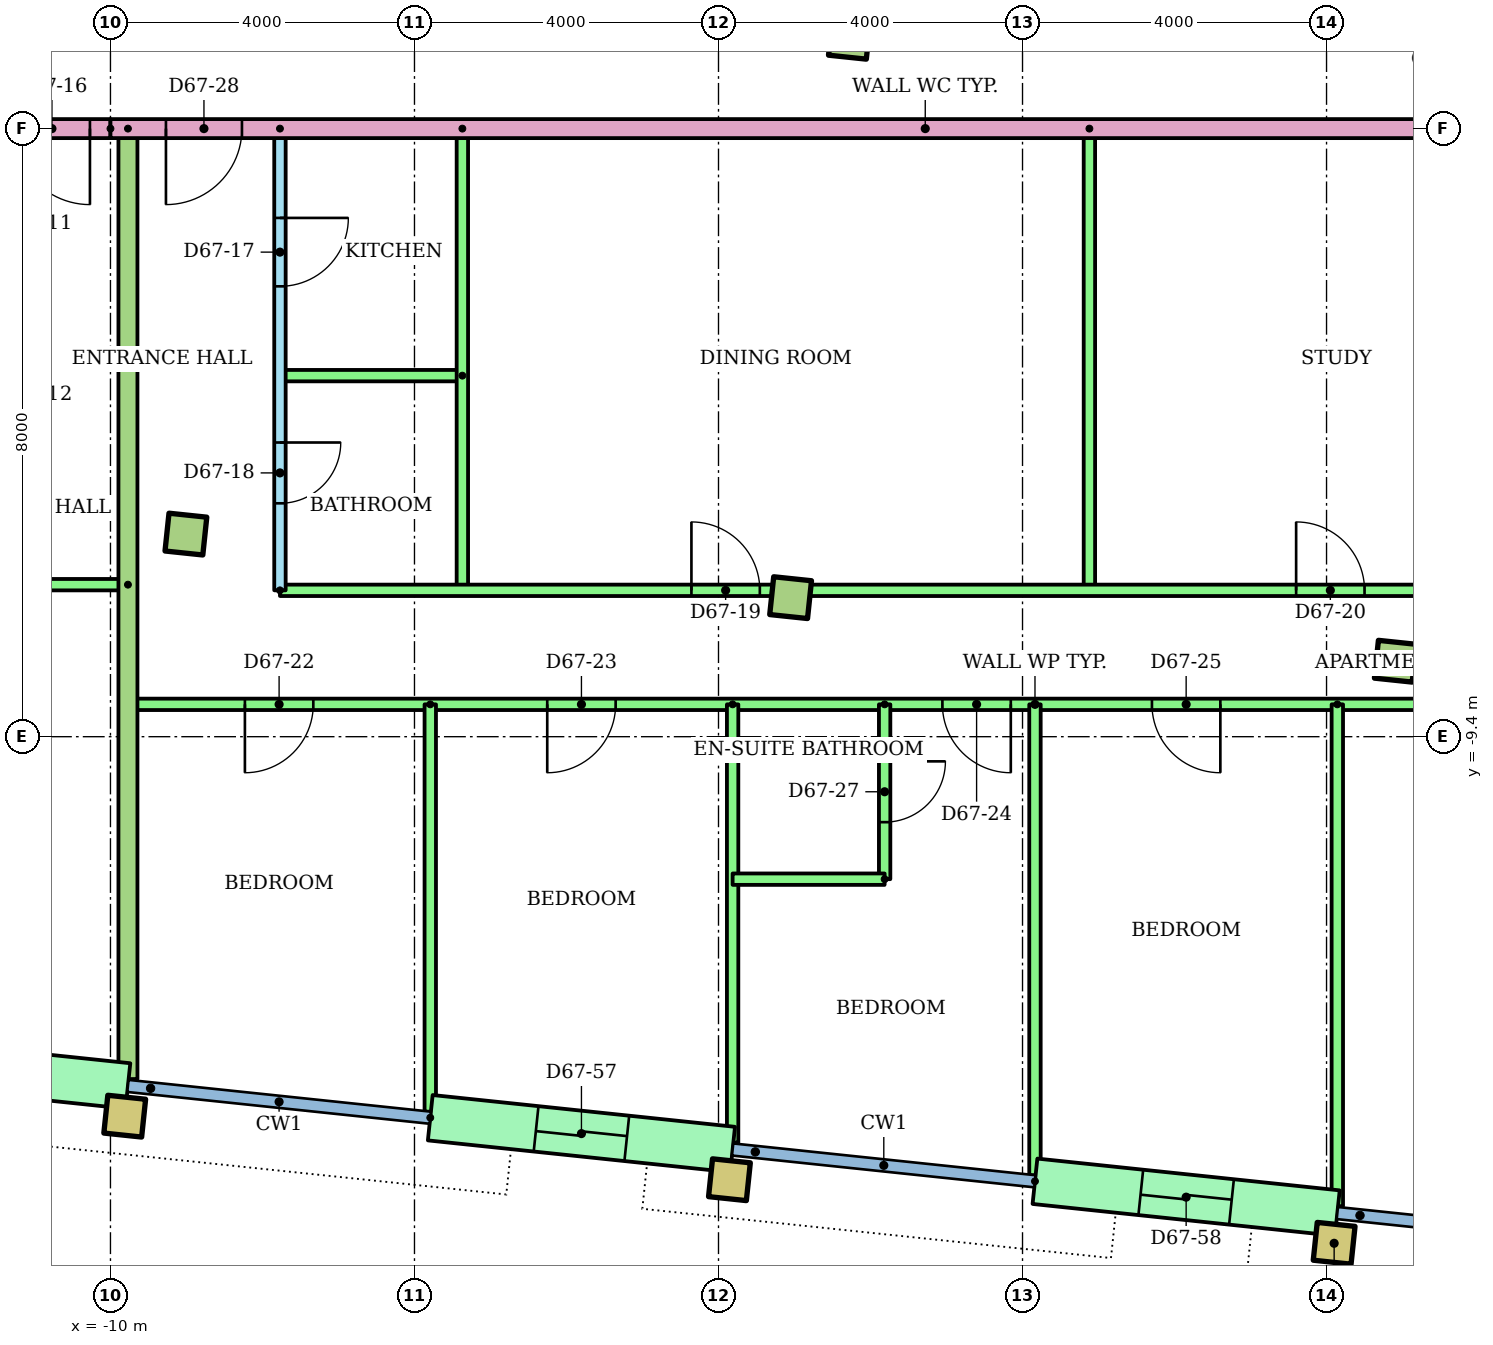
"""IFC4 building model, lengths in metres.
Left out: names, types, materials, properties, quantities, classifications, styles, units other than length and angle.
Written with IfcOpenShell. Run it as: python <this file> out.ifc"""

import sys

from ifc_helpers import new_model, si_unit, direction, frame, frame_2d, origin, origin_2d, place, context, subcontext, project, spatial, rectangle, hollow_rectangle, extrude, element, fill, save


model = new_model("IFC4")
c1 = context("Model", 3, precision=1e-05, world=origin(), true_north=direction((0.0, 1.0)))
c2 = subcontext(c1, "Body", "Model", "MODEL_VIEW")
j1 = project(units=[si_unit("LENGTHUNIT", "METRE"), si_unit("PLANEANGLEUNIT", "RADIAN")], contexts=[c1])
p1 = place(None, origin())
s1 = spatial("IfcSite", under=j1, at=p1, CompositionType="ELEMENT")
p2 = place(p1, origin())
s2 = spatial("IfcBuilding", under=s1, at=p2, CompositionType="ELEMENT")
p3 = place(p2, frame((0.0, 0.0, 259.5)))
s3 = spatial("IfcBuildingStorey", under=s2, at=p3, CompositionType="ELEMENT", Elevation=259.5)
for number, where, z_axis, x_axis in (
    (1, (-9.812, -14.392, 0.0), (0.0, 0.0, 1.0), (0.995, -0.105, 0.0)),
    (2, (-1.856, -15.229, 0.0), (0.0, 0.0, 1.0), (0.995, -0.105, 0.0)),
    (3, (6.1, -16.065, 0.0), (0.0, 0.0, 1.0), (0.995, -0.105, 0.0)),
):
    element("IfcColumn", number, at=place(p3, frame(where, z_axis=z_axis, x_axis=x_axis)), inside=s3, PredefinedType="COLUMN", context=c2, shape_type="SweptSolid", body=[
        extrude(hollow_rectangle(XDim=0.5, YDim=0.5, WallThickness=0.025, at=origin_2d()), origin(), (0.0, 0.0, 1.0), 3.2),
    ])
for number, where, z_axis, x_axis in (
    (4, (-9.007, -6.735, 0.0), (0.0, 0.0, 1.0), (0.995, -0.105, 0.0)),
    (5, (-1.051, -7.571, 0.0), (0.0, 0.0, 1.0), (0.995, -0.105, 0.0)),
    (6, (6.905, -8.407, 0.0), (0.0, 0.0, 1.0), (0.995, -0.105, 0.0)),
    (7, (-0.278, -0.211, 0.0), (0.0, 0.0, 1.0), (0.995, -0.105, 0.0)),
):
    element("IfcColumn", number, at=place(p3, frame(where, z_axis=z_axis, x_axis=x_axis)), inside=s3, PredefinedType="COLUMN", context=c2, shape_type="SweptSolid", body=[
        extrude(rectangle(XDim=0.5, YDim=0.5, at=origin_2d()), origin(), (0.0, 0.0, 1.0), 3.2),
    ])
p4 = place(p3, frame((-13.749, -13.576, 0.0), z_axis=(0.0, 0.0, 1.0), x_axis=(0.994519156568, -0.104554517933, 0.0)))
e8 = element("IfcWall", 8, at=p4, inside=s3, PredefinedType="STANDARD", context=c2, shape_type="SweptSolid", body=[
    extrude(rectangle(XDim=4.0, YDim=0.6, at=frame_2d((2.0, 0.0))), origin(), (0.0, 0.0, 1.0), 2.92),
])
p5 = place(p4, frame((1.4, 0.0, 0.0)))
e9 = element("IfcOpeningElement", 9, at=p5, cuts=e8, PredefinedType="OPENING", context=c2, shape_type="SweptSolid", body=[
    extrude(rectangle(XDim=1.2, YDim=2.1, at=frame_2d((0.6, 1.05))), frame((0.0, 0.31, 0.0), z_axis=(0.0, -1.0, 0.0), x_axis=(1.0, 0.0, 0.0)), (0.0, 0.0, 1.0), 0.62),
])
p6 = place(p3, frame((-5.792, -14.413, 0.0), z_axis=(0.0, 0.0, 1.0), x_axis=(0.99452550138, -0.104494148666, 0.0)))
e10 = element("IfcWall", 10, at=p6, inside=s3, PredefinedType="STANDARD", context=c2, shape_type="SweptSolid", body=[
    extrude(rectangle(XDim=4.0, YDim=0.6, at=frame_2d((2.0, 0.0))), origin(), (0.0, 0.0, 1.0), 2.92),
])
p7 = place(p6, frame((1.4, 0.0, 0.0)))
e11 = element("IfcOpeningElement", 11, at=p7, cuts=e10, PredefinedType="OPENING", context=c2, shape_type="SweptSolid", body=[
    extrude(rectangle(XDim=1.2, YDim=2.1, at=frame_2d((0.6, 1.05))), frame((0.0, 0.31, 0.0), z_axis=(0.0, -1.0, 0.0), x_axis=(1.0, 0.0, 0.0)), (0.0, 0.0, 1.0), 0.62),
])
p8 = place(p3, frame((2.164, -15.249, 0.0), z_axis=(0.0, 0.0, 1.0), x_axis=(0.99452550138, -0.104494148666, 0.0)))
e12 = element("IfcWall", 12, at=p8, inside=s3, PredefinedType="STANDARD", context=c2, shape_type="SweptSolid", body=[
    extrude(rectangle(XDim=4.0, YDim=0.6, at=frame_2d((2.0, 0.0))), origin(), (0.0, 0.0, 1.0), 2.92),
])
p9 = place(p8, frame((1.4, 0.0, 0.0)))
e13 = element("IfcOpeningElement", 13, at=p9, cuts=e12, PredefinedType="OPENING", context=c2, shape_type="SweptSolid", body=[
    extrude(rectangle(XDim=1.2, YDim=2.1, at=frame_2d((0.6, 1.05))), frame((0.0, 0.31, 0.0), z_axis=(0.0, -1.0, 0.0), x_axis=(1.0, 0.0, 0.0)), (0.0, 0.0, 1.0), 0.62),
])
p10 = place(p3, frame((-9.77, -7.4, 0.0), z_axis=(0.0, 0.0, 1.0), x_axis=(-1.0, 0.0, 0.0)))
e14 = element("IfcWall", 14, at=p10, inside=s3, PredefinedType="PARTITIONING", context=c2, shape_type="SweptSolid", body=[
    extrude(rectangle(XDim=14.411, YDim=0.15, at=frame_2d((7.206, 0.0))), origin(), (0.0, 0.0, 1.0), 2.4),
])
p11 = place(p10, frame((5.789, 0.0, 0.0)))
e15 = element("IfcOpeningElement", 15, at=p11, cuts=e14, PredefinedType="OPENING", context=c2, shape_type="SweptSolid", body=[
    extrude(rectangle(XDim=1.0, YDim=2.1, at=frame_2d((0.5, 1.05))), frame((0.0, 0.085, 0.0), z_axis=(0.0, -1.0, 0.0), x_axis=(1.0, 0.0, 0.0)), (0.0, 0.0, 1.0), 0.17),
])
p12 = place(p3, frame((-7.77, -1.4, 0.0), z_axis=(0.0, 0.0, 1.0), x_axis=(0.0, -1.0, 0.0)))
e16 = element("IfcWall", 16, at=p12, inside=s3, PredefinedType="PARTITIONING", context=c2, shape_type="SweptSolid", body=[
    extrude(rectangle(XDim=6.075, YDim=0.15, at=frame_2d((3.037, 0.0))), origin(), (0.0, 0.0, 1.0), 2.4),
])
p13 = place(p12, frame((1.175, 0.0, 0.0)))
e17 = element("IfcOpeningElement", 17, at=p13, cuts=e16, PredefinedType="OPENING", context=c2, shape_type="SweptSolid", body=[
    extrude(rectangle(XDim=0.9, YDim=2.1, at=frame_2d((0.45, 1.05))), frame((0.0, 0.085, 0.0), z_axis=(0.0, -1.0, 0.0), x_axis=(1.0, 0.0, 0.0)), (0.0, 0.0, 1.0), 0.17),
])
p14 = place(p12, frame((4.13, 0.0, 0.0)))
e18 = element("IfcOpeningElement", 18, at=p14, cuts=e16, PredefinedType="OPENING", context=c2, shape_type="SweptSolid", body=[
    extrude(rectangle(XDim=0.8, YDim=2.1, at=frame_2d((0.4, 1.05))), frame((0.0, 0.085, 0.0), z_axis=(0.0, -1.0, 0.0), x_axis=(1.0, 0.0, 0.0)), (0.0, 0.0, 1.0), 0.17),
])
p15 = place(p3, frame((-5.37, -4.65, 0.0), z_axis=(0.0, 0.0, 1.0), x_axis=(-1.0, 0.0, 0.0)))
e19 = element("IfcWall", 19, at=p15, inside=s3, PredefinedType="PARTITIONING", context=c2, shape_type="SweptSolid", body=[
    extrude(rectangle(XDim=2.4, YDim=0.15, at=frame_2d((1.2, 0.0))), origin(), (0.0, 0.0, 1.0), 2.4),
])
for number, where, z_axis, x_axis in (
    (20, (-5.37, -1.4, 0.0), (0.0, 0.0, 1.0), (0.0, -1.0, 0.0)),
    (21, (2.88, -1.4, 0.0), (0.0, 0.0, 1.0), (0.0, -1.0, 0.0)),
):
    element("IfcWall", number, at=place(p3, frame(where, z_axis=z_axis, x_axis=x_axis)), inside=s3, PredefinedType="PARTITIONING", context=c2, shape_type="SweptSolid", body=[
        extrude(rectangle(XDim=6.075, YDim=0.15, at=frame_2d((3.037, 0.0))), origin(), (0.0, 0.0, 1.0), 2.4),
    ])
p16 = place(p3, frame((-7.77, -7.475, 0.0)))
e22 = element("IfcWall", 22, at=p16, inside=s3, PredefinedType="PARTITIONING", context=c2, shape_type="SweptSolid", body=[
    extrude(rectangle(XDim=21.868, YDim=0.15, at=frame_2d((10.934, 0.0))), origin(), (0.0, 0.0, 1.0), 2.4),
])
p17 = place(p16, frame((5.414, 0.0, 0.0)))
e23 = element("IfcOpeningElement", 23, at=p17, cuts=e22, PredefinedType="OPENING", context=c2, shape_type="SweptSolid", body=[
    extrude(rectangle(XDim=0.9, YDim=2.1, at=frame_2d((0.45, 1.05))), frame((0.0, 0.085, 0.0), z_axis=(0.0, -1.0, 0.0), x_axis=(1.0, 0.0, 0.0)), (0.0, 0.0, 1.0), 0.17),
])
p18 = place(p16, frame((13.37, 0.0, 0.0)))
e24 = element("IfcOpeningElement", 24, at=p18, cuts=e22, PredefinedType="OPENING", context=c2, shape_type="SweptSolid", body=[
    extrude(rectangle(XDim=0.9, YDim=2.1, at=frame_2d((0.45, 1.05))), frame((0.0, 0.085, 0.0), z_axis=(0.0, -1.0, 0.0), x_axis=(1.0, 0.0, 0.0)), (0.0, 0.0, 1.0), 0.17),
])
p19 = place(p16, frame((19.059, 0.0, 0.0)))
e25 = element("IfcOpeningElement", 25, at=p19, cuts=e22, PredefinedType="OPENING", context=c2, shape_type="SweptSolid", body=[
    extrude(rectangle(XDim=0.9, YDim=2.1, at=frame_2d((0.45, 1.05))), frame((0.0, 0.085, 0.0), z_axis=(0.0, -1.0, 0.0), x_axis=(1.0, 0.0, 0.0)), (0.0, 0.0, 1.0), 0.17),
])
p20 = place(p3, frame((14.098, -8.975, 0.0), z_axis=(0.0, 0.0, 1.0), x_axis=(-1.0, 0.0, 0.0)))
e26 = element("IfcWall", 26, at=p20, inside=s3, PredefinedType="PARTITIONING", context=c2, shape_type="SweptSolid", body=[
    extrude(rectangle(XDim=23.868, YDim=0.15, at=frame_2d((11.934, 0.0))), origin(), (0.0, 0.0, 1.0), 2.4),
])
p21 = place(p20, frame((21.429, 0.0, 0.0)))
e27 = element("IfcOpeningElement", 27, at=p21, cuts=e26, PredefinedType="OPENING", context=c2, shape_type="SweptSolid", body=[
    extrude(rectangle(XDim=0.9, YDim=2.1, at=frame_2d((0.45, 1.05))), frame((0.0, 0.085, 0.0), z_axis=(0.0, -1.0, 0.0), x_axis=(1.0, 0.0, 0.0)), (0.0, 0.0, 1.0), 0.17),
])
p22 = place(p20, frame((17.451, 0.0, 0.0)))
e28 = element("IfcOpeningElement", 28, at=p22, cuts=e26, PredefinedType="OPENING", context=c2, shape_type="SweptSolid", body=[
    extrude(rectangle(XDim=0.9, YDim=2.1, at=frame_2d((0.45, 1.05))), frame((0.0, 0.085, 0.0), z_axis=(0.0, -1.0, 0.0), x_axis=(1.0, 0.0, 0.0)), (0.0, 0.0, 1.0), 0.17),
])
p23 = place(p20, frame((12.252, 0.0, 0.0)))
e29 = element("IfcOpeningElement", 29, at=p23, cuts=e26, PredefinedType="OPENING", context=c2, shape_type="SweptSolid", body=[
    extrude(rectangle(XDim=0.9, YDim=2.1, at=frame_2d((0.45, 1.05))), frame((0.0, 0.085, 0.0), z_axis=(0.0, -1.0, 0.0), x_axis=(1.0, 0.0, 0.0)), (0.0, 0.0, 1.0), 0.17),
])
p24 = place(p20, frame((9.495, 0.0, 0.0)))
e30 = element("IfcOpeningElement", 30, at=p24, cuts=e26, PredefinedType="OPENING", context=c2, shape_type="SweptSolid", body=[
    extrude(rectangle(XDim=0.9, YDim=2.1, at=frame_2d((0.45, 1.05))), frame((0.0, 0.085, 0.0), z_axis=(0.0, -1.0, 0.0), x_axis=(1.0, 0.0, 0.0)), (0.0, 0.0, 1.0), 0.17),
])
p25 = place(p20, frame((3.478, 0.0, 0.0)))
e31 = element("IfcOpeningElement", 31, at=p25, cuts=e26, PredefinedType="OPENING", context=c2, shape_type="SweptSolid", body=[
    extrude(rectangle(XDim=1.0, YDim=2.1, at=frame_2d((0.5, 1.05))), frame((0.0, 0.085, 0.0), z_axis=(0.0, -1.0, 0.0), x_axis=(1.0, 0.0, 0.0)), (0.0, 0.0, 1.0), 0.17),
])
p26 = place(p3, frame((-5.792, -8.975, 0.0), z_axis=(0.0, 0.0, 1.0), x_axis=(0.0, -1.0, 0.0)))
e32 = element("IfcWall", 32, at=p26, inside=s3, PredefinedType="PARTITIONING", context=c2, shape_type="SweptSolid", body=[
    extrude(rectangle(XDim=5.359, YDim=0.15, at=frame_2d((2.679, 0.0))), origin(), (0.0, 0.0, 1.0), 2.4),
])
p27 = place(p3, frame((-1.814, -8.975, 0.0), z_axis=(0.0, 0.0, 1.0), x_axis=(0.0, -1.0, 0.0)))
e33 = element("IfcWall", 33, at=p27, inside=s3, PredefinedType="PARTITIONING", context=c2, shape_type="SweptSolid", body=[
    extrude(rectangle(XDim=5.766, YDim=0.15, at=frame_2d((2.883, 0.0))), origin(), (0.0, 0.0, 1.0), 2.4),
])
p28 = place(p3, frame((2.164, -8.975, 0.0), z_axis=(0.0, 0.0, 1.0), x_axis=(0.0, -1.0, 0.0)))
e34 = element("IfcWall", 34, at=p28, inside=s3, PredefinedType="PARTITIONING", context=c2, shape_type="SweptSolid", body=[
    extrude(rectangle(XDim=6.195, YDim=0.15, at=frame_2d((3.097, 0.0))), origin(), (0.0, 0.0, 1.0), 2.4),
])
p29 = place(p3, frame((6.142, -8.975, 0.0), z_axis=(0.0, 0.0, 1.0), x_axis=(0.0, -1.0, 0.0)))
e35 = element("IfcWall", 35, at=p29, inside=s3, PredefinedType="PARTITIONING", context=c2, shape_type="SweptSolid", body=[
    extrude(rectangle(XDim=6.602, YDim=0.15, at=frame_2d((3.301, 0.0))), origin(), (0.0, 0.0, 1.0), 2.4),
])
p30 = place(p3, frame((0.186, -8.975, 0.0), z_axis=(0.0, 0.0, 1.0), x_axis=(0.0, -1.0, 0.0)))
e36 = element("IfcWall", 36, at=p30, inside=s3, PredefinedType="PARTITIONING", context=c2, shape_type="SweptSolid", body=[
    extrude(rectangle(XDim=2.3, YDim=0.15, at=frame_2d((1.15, 0.0))), origin(), (0.0, 0.0, 1.0), 2.4),
])
p31 = place(p30, frame((0.75, 0.0, 0.0)))
e37 = element("IfcOpeningElement", 37, at=p31, cuts=e36, PredefinedType="OPENING", context=c2, shape_type="SweptSolid", body=[
    extrude(rectangle(XDim=0.8, YDim=2.1, at=frame_2d((0.4, 1.05))), frame((0.0, 0.085, 0.0), z_axis=(0.0, -1.0, 0.0), x_axis=(1.0, 0.0, 0.0)), (0.0, 0.0, 1.0), 0.17),
])
p32 = place(p3, frame((0.186, -11.274, 0.0), z_axis=(0.0, 0.0, 1.0), x_axis=(-1.0, 0.0, 0.0)))
e38 = element("IfcWall", 38, at=p32, inside=s3, PredefinedType="PARTITIONING", context=c2, shape_type="SweptSolid", body=[
    extrude(rectangle(XDim=2.0, YDim=0.15, at=frame_2d((1.0, 0.0))), origin(), (0.0, 0.0, 1.0), 2.4),
])
p33 = place(p3, frame((-9.77, -1.4, 0.0), z_axis=(0.0, 0.0, 1.0), x_axis=(0.0, -1.0, 0.0)))
e39 = element("IfcWall", 39, at=p33, inside=s3, PredefinedType="PARTITIONING", context=c2, shape_type="SweptSolid", body=[
    extrude(rectangle(XDim=12.504, YDim=0.25, at=frame_2d((6.252, 0.0))), origin(), (0.0, 0.0, 1.0), 2.4),
])
p34 = place(p3, frame((-10.0, -1.4, 0.0), z_axis=(0.0, 0.0, 1.0), x_axis=(-1.0, 0.0, 0.0)))
e40 = element("IfcWall", 40, at=p34, inside=s3, PredefinedType="PARTITIONING", context=c2, shape_type="SweptSolid", body=[
    extrude(rectangle(XDim=13.56, YDim=0.25, at=frame_2d((6.78, 0.0))), origin(), (0.0, 0.0, 1.0), 2.4),
])
p35 = place(p34, frame((0.27, 0.0, 0.0)))
e41 = element("IfcOpeningElement", 41, at=p35, cuts=e40, PredefinedType="OPENING", context=c2, shape_type="SweptSolid", body=[
    extrude(rectangle(XDim=1.0, YDim=2.1, at=frame_2d((0.5, 1.05))), frame((0.0, 0.135, 0.0), z_axis=(0.0, -1.0, 0.0), x_axis=(1.0, 0.0, 0.0)), (0.0, 0.0, 1.0), 0.27),
])
p36 = place(p3, frame((10.0, -1.4, 0.0), z_axis=(0.0, 0.0, 1.0), x_axis=(-1.0, 0.0, 0.0)))
e42 = element("IfcWall", 42, at=p36, inside=s3, PredefinedType="PARTITIONING", context=c2, shape_type="SweptSolid", body=[
    extrude(rectangle(XDim=20.0, YDim=0.25, at=frame_2d((10.0, 0.0))), origin(), (0.0, 0.0, 1.0), 2.4),
])
p37 = place(p36, frame((18.27, 0.0, 0.0)))
e43 = element("IfcOpeningElement", 43, at=p37, cuts=e42, PredefinedType="OPENING", context=c2, shape_type="SweptSolid", body=[
    extrude(rectangle(XDim=1.0, YDim=2.1, at=frame_2d((0.5, 1.05))), frame((0.0, 0.135, 0.0), z_axis=(0.0, -1.0, 0.0), x_axis=(1.0, 0.0, 0.0)), (0.0, 0.0, 1.0), 0.27),
])
p38 = place(p35, origin())
e44 = element("IfcDoor", 44, at=p38, inside=s3, OperationType="SINGLE_SWING_LEFT", PredefinedType="DOOR", context=c2, shape_type="SweptSolid", body=[
    extrude(rectangle(XDim=1.0, YDim=2.1, at=frame_2d((0.5, 1.05))), frame((0.0, 0.025, 0.0), z_axis=(0.0, -1.0, 0.0), x_axis=(1.0, 0.0, 0.0)), (0.0, 0.0, 1.0), 0.05),
])
fill(e41, e44)
p39 = place(p13, origin())
e45 = element("IfcDoor", 45, at=p39, inside=s3, OperationType="SINGLE_SWING_LEFT", PredefinedType="DOOR", context=c2, shape_type="SweptSolid", body=[
    extrude(rectangle(XDim=0.9, YDim=2.1, at=frame_2d((0.45, 1.05))), frame((0.0, 0.025, 0.0), z_axis=(0.0, -1.0, 0.0), x_axis=(1.0, 0.0, 0.0)), (0.0, 0.0, 1.0), 0.05),
])
fill(e17, e45)
p40 = place(p14, origin())
e46 = element("IfcDoor", 46, at=p40, inside=s3, OperationType="SINGLE_SWING_LEFT", PredefinedType="DOOR", context=c2, shape_type="SweptSolid", body=[
    extrude(rectangle(XDim=0.8, YDim=2.1, at=frame_2d((0.4, 1.05))), frame((0.0, 0.025, 0.0), z_axis=(0.0, -1.0, 0.0), x_axis=(1.0, 0.0, 0.0)), (0.0, 0.0, 1.0), 0.05),
])
fill(e18, e46)
p41 = place(p17, origin())
e47 = element("IfcDoor", 47, at=p41, inside=s3, OperationType="SINGLE_SWING_LEFT", PredefinedType="DOOR", context=c2, shape_type="SweptSolid", body=[
    extrude(rectangle(XDim=0.9, YDim=2.1, at=frame_2d((0.45, 1.05))), frame((0.0, 0.025, 0.0), z_axis=(0.0, -1.0, 0.0), x_axis=(1.0, 0.0, 0.0)), (0.0, 0.0, 1.0), 0.05),
])
fill(e23, e47)
p42 = place(p18, origin())
e48 = element("IfcDoor", 48, at=p42, inside=s3, OperationType="SINGLE_SWING_LEFT", PredefinedType="DOOR", context=c2, shape_type="SweptSolid", body=[
    extrude(rectangle(XDim=0.9, YDim=2.1, at=frame_2d((0.45, 1.05))), frame((0.0, 0.025, 0.0), z_axis=(0.0, -1.0, 0.0), x_axis=(1.0, 0.0, 0.0)), (0.0, 0.0, 1.0), 0.05),
])
fill(e24, e48)
p43 = place(p21, origin())
e49 = element("IfcDoor", 49, at=p43, inside=s3, OperationType="SINGLE_SWING_RIGHT", PredefinedType="DOOR", context=c2, shape_type="SweptSolid", body=[
    extrude(rectangle(XDim=0.9, YDim=2.1, at=frame_2d((0.45, 1.05))), frame((0.0, 0.025, 0.0), z_axis=(0.0, -1.0, 0.0), x_axis=(1.0, 0.0, 0.0)), (0.0, 0.0, 1.0), 0.05),
])
fill(e27, e49)
p44 = place(p22, origin())
e50 = element("IfcDoor", 50, at=p44, inside=s3, OperationType="SINGLE_SWING_RIGHT", PredefinedType="DOOR", context=c2, shape_type="SweptSolid", body=[
    extrude(rectangle(XDim=0.9, YDim=2.1, at=frame_2d((0.45, 1.05))), frame((0.0, 0.025, 0.0), z_axis=(0.0, -1.0, 0.0), x_axis=(1.0, 0.0, 0.0)), (0.0, 0.0, 1.0), 0.05),
])
fill(e28, e50)
p45 = place(p23, origin())
e51 = element("IfcDoor", 51, at=p45, inside=s3, OperationType="SINGLE_SWING_LEFT", PredefinedType="DOOR", context=c2, shape_type="SweptSolid", body=[
    extrude(rectangle(XDim=0.9, YDim=2.1, at=frame_2d((0.45, 1.05))), frame((0.0, 0.025, 0.0), z_axis=(0.0, -1.0, 0.0), x_axis=(1.0, 0.0, 0.0)), (0.0, 0.0, 1.0), 0.05),
])
fill(e29, e51)
p46 = place(p24, origin())
e52 = element("IfcDoor", 52, at=p46, inside=s3, OperationType="SINGLE_SWING_LEFT", PredefinedType="DOOR", context=c2, shape_type="SweptSolid", body=[
    extrude(rectangle(XDim=0.9, YDim=2.1, at=frame_2d((0.45, 1.05))), frame((0.0, 0.025, 0.0), z_axis=(0.0, -1.0, 0.0), x_axis=(1.0, 0.0, 0.0)), (0.0, 0.0, 1.0), 0.05),
])
fill(e30, e52)
p47 = place(p31, origin())
e53 = element("IfcDoor", 53, at=p47, inside=s3, OperationType="SINGLE_SWING_LEFT", PredefinedType="DOOR", context=c2, shape_type="SweptSolid", body=[
    extrude(rectangle(XDim=0.8, YDim=2.1, at=frame_2d((0.4, 1.05))), frame((0.0, 0.025, 0.0), z_axis=(0.0, -1.0, 0.0), x_axis=(1.0, 0.0, 0.0)), (0.0, 0.0, 1.0), 0.05),
])
fill(e37, e53)
p48 = place(p37, origin())
e54 = element("IfcDoor", 54, at=p48, inside=s3, OperationType="SINGLE_SWING_RIGHT", PredefinedType="DOOR", context=c2, shape_type="SweptSolid", body=[
    extrude(rectangle(XDim=1.0, YDim=2.1, at=frame_2d((0.5, 1.05))), frame((0.0, 0.025, 0.0), z_axis=(0.0, -1.0, 0.0), x_axis=(1.0, 0.0, 0.0)), (0.0, 0.0, 1.0), 0.05),
])
fill(e43, e54)
p49 = place(p7, origin())
e55 = element("IfcDoor", 55, at=p49, inside=s3, OperationType="SLIDING_TO_LEFT", PredefinedType="DOOR", context=c2, shape_type="SweptSolid", body=[
    extrude(rectangle(XDim=1.2, YDim=2.1, at=frame_2d((0.6, 1.05))), frame((0.0, 0.025, 0.0), z_axis=(0.0, -1.0, 0.0), x_axis=(1.0, 0.0, 0.0)), (0.0, 0.0, 1.0), 0.05),
])
fill(e11, e55)
p50 = place(p9, origin())
e56 = element("IfcDoor", 56, at=p50, inside=s3, OperationType="SLIDING_TO_LEFT", PredefinedType="DOOR", context=c2, shape_type="SweptSolid", body=[
    extrude(rectangle(XDim=1.2, YDim=2.1, at=frame_2d((0.6, 1.05))), frame((0.0, 0.025, 0.0), z_axis=(0.0, -1.0, 0.0), x_axis=(1.0, 0.0, 0.0)), (0.0, 0.0, 1.0), 0.05),
])
fill(e13, e56)
save(model, sys.argv[1])
